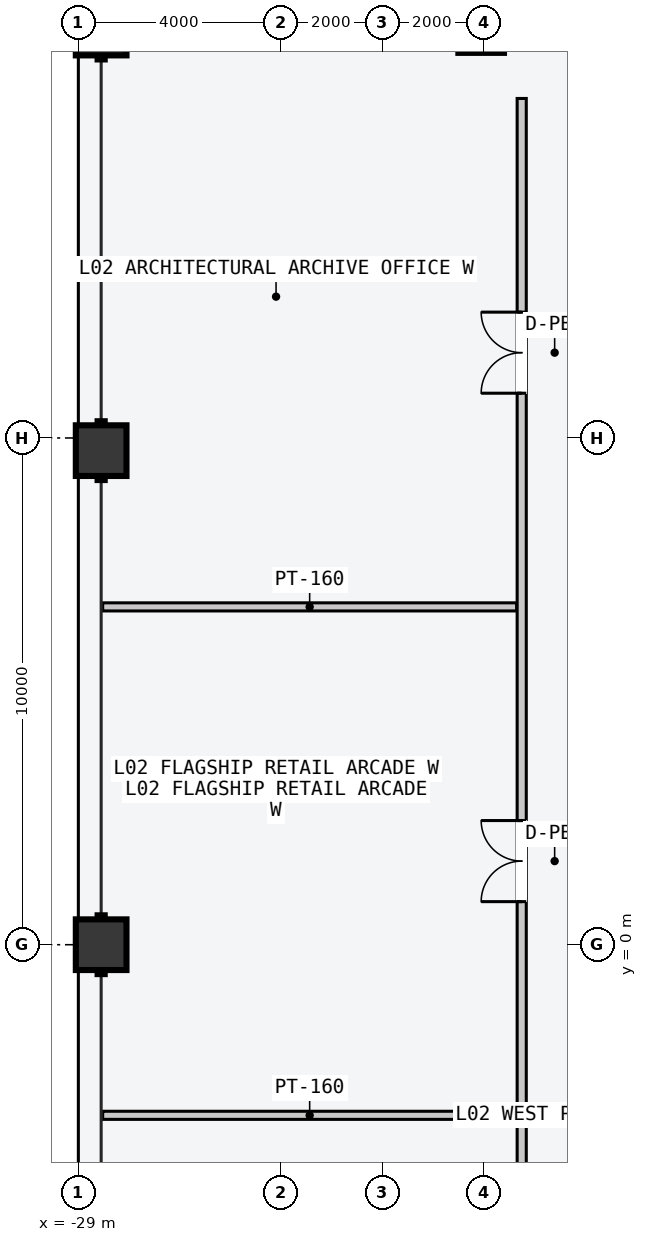
"""IFC4 building model, lengths in metres.
Left out: names, types, materials, properties, quantities, classifications, styles, units other than length and angle.
Written with IfcOpenShell. Run it as: python <this file> out.ifc"""

import sys

from ifc_helpers import new_model, si_unit, direction, frame, frame_2d, origin, origin_2d, place, context, subcontext, project, spatial, rectangle, hollow_rectangle, extrude, element, fill, save


model = new_model("IFC4")
c1 = context("Model", 3, precision=1e-05, world=origin(), true_north=direction((0.0, 1.0)))
c2 = subcontext(c1, "Body", "Model", "MODEL_VIEW")
j1 = project(units=[si_unit("LENGTHUNIT", "METRE"), si_unit("PLANEANGLEUNIT", "RADIAN")], contexts=[c1])
p1 = place(None, origin())
s1 = spatial("IfcSite", under=j1, at=p1, CompositionType="ELEMENT")
p2 = place(p1, origin())
s2 = spatial("IfcBuilding", under=s1, at=p2, CompositionType="ELEMENT")
p3 = place(p2, frame((0.0, 0.0, 9.6)))
s3 = spatial("IfcBuildingStorey", under=s2, at=p3, CompositionType="ELEMENT", Elevation=9.6)
p4 = place(p3, frame((-21.05, 18.05, 0.0), z_axis=(0.0, 0.0, 1.0), x_axis=(1.0, 0.0, 0.0)))
e1 = element("IfcColumn", 1, at=p4, inside=s3, PredefinedType="COLUMN", context=c2, shape_type="SweptSolid", body=[
    extrude(hollow_rectangle(XDim=0.9, YDim=0.9, WallThickness=0.045, at=origin_2d()), origin(), (0.0, 0.0, 1.0), 4.8),
])
for number, where, z_axis, x_axis in (
    (2, (-28.55, 0.0, 0.0), (0.0, 0.0, 1.0), (0.0, 1.0, 0.0)),
    (3, (-28.55, 9.75, 0.0), (0.0, 0.0, 1.0), (0.0, 1.0, 0.0)),
    (4, (-28.55, 18.05, 0.0), (0.0, 0.0, 1.0), (0.0, 1.0, 0.0)),
):
    element("IfcColumn", number, at=place(p3, frame(where, z_axis=z_axis, x_axis=x_axis)), inside=s3, PredefinedType="COLUMN", context=c2, shape_type="SweptSolid", body=[
        extrude(hollow_rectangle(XDim=1.0, YDim=1.0, WallThickness=0.05, at=origin_2d()), origin(), (0.0, 0.0, 1.0), 4.8),
    ])
p5 = place(p3, frame((-20.35, -3.367, 0.0), z_axis=(0.0, 0.0, 1.0), x_axis=(-1.0, 0.0, 0.0)))
e5 = element("IfcWall", 5, at=p5, inside=s3, PredefinedType="PARTITIONING", context=c2, shape_type="SweptSolid", body=[
    extrude(rectangle(XDim=8.17, YDim=0.16, at=frame_2d((4.085, 0.0))), origin(), (0.0, 0.0, 1.0), 4.08),
])
p6 = place(p3, frame((-20.35, 6.667, 0.0), z_axis=(0.0, 0.0, 1.0), x_axis=(-1.0, 0.0, 0.0)))
e6 = element("IfcWall", 6, at=p6, inside=s3, PredefinedType="PARTITIONING", context=c2, shape_type="SweptSolid", body=[
    extrude(rectangle(XDim=8.17, YDim=0.16, at=frame_2d((4.085, 0.0))), origin(), (0.0, 0.0, 1.0), 4.58),
])
p7 = place(p3, frame((-20.25, -20.6, 0.0), z_axis=(0.0, 0.0, 1.0), x_axis=(0.0, 1.0, 0.0)))
e7 = element("IfcWall", 7, at=p7, inside=s3, PredefinedType="PARTITIONING", context=c2, shape_type="SweptSolid", body=[
    extrude(rectangle(XDim=37.3, YDim=0.18, at=frame_2d((18.65, 0.0))), origin(), (0.0, 0.0, 1.0), 4.58),
])
p8 = place(p7, frame((11.417, 0.0, 0.0)))
e8 = element("IfcOpeningElement", 8, at=p8, cuts=e7, PredefinedType="OPENING", context=c2, shape_type="SweptSolid", body=[
    extrude(rectangle(XDim=1.6, YDim=2.3, at=frame_2d((0.8, 1.15))), frame((0.0, 0.1, 0.0), z_axis=(0.0, -1.0, 0.0), x_axis=(1.0, 0.0, 0.0)), (0.0, 0.0, 1.0), 0.2),
])
p9 = place(p7, frame((21.45, 0.0, 0.0)))
e9 = element("IfcOpeningElement", 9, at=p9, cuts=e7, PredefinedType="OPENING", context=c2, shape_type="SweptSolid", body=[
    extrude(rectangle(XDim=1.6, YDim=2.3, at=frame_2d((0.8, 1.15))), frame((0.0, 0.1, 0.0), z_axis=(0.0, -1.0, 0.0), x_axis=(1.0, 0.0, 0.0)), (0.0, 0.0, 1.0), 0.2),
])
p10 = place(p7, frame((31.483, 0.0, 0.0)))
e10 = element("IfcOpeningElement", 10, at=p10, cuts=e7, PredefinedType="OPENING", context=c2, shape_type="SweptSolid", body=[
    extrude(rectangle(XDim=1.6, YDim=2.3, at=frame_2d((0.8, 1.15))), frame((0.0, 0.1, 0.0), z_axis=(0.0, -1.0, 0.0), x_axis=(1.0, 0.0, 0.0)), (0.0, 0.0, 1.0), 0.2),
])
p11 = place(p9, origin())
e11 = element("IfcDoor", 11, at=p11, inside=s3, OperationType="DOUBLE_DOOR_SINGLE_SWING", PredefinedType="DOOR", context=c2, shape_type="SweptSolid", body=[
    extrude(rectangle(XDim=1.6, YDim=2.3, at=frame_2d((0.8, 1.15))), frame((0.0, 0.025, 0.0), z_axis=(0.0, -1.0, 0.0), x_axis=(1.0, 0.0, 0.0)), (0.0, 0.0, 1.0), 0.05),
])
fill(e9, e11)
p12 = place(p10, origin())
e12 = element("IfcDoor", 12, at=p12, inside=s3, OperationType="DOUBLE_DOOR_SINGLE_SWING", PredefinedType="DOOR", context=c2, shape_type="SweptSolid", body=[
    extrude(rectangle(XDim=1.6, YDim=2.3, at=frame_2d((0.8, 1.15))), frame((0.0, 0.025, 0.0), z_axis=(0.0, -1.0, 0.0), x_axis=(1.0, 0.0, 0.0)), (0.0, 0.0, 1.0), 0.05),
])
fill(e10, e12)
save(model, sys.argv[1])
